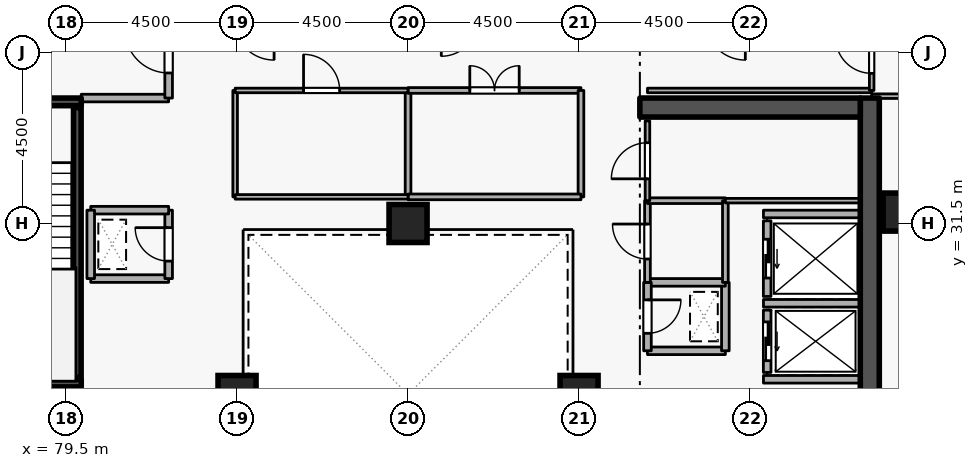
"""IFC4 building model, lengths in metres.
Left out: names, types, materials, properties, quantities, classifications, styles, units other than length and angle.
Written with IfcOpenShell. Run it as: python <this file> out.ifc"""

import sys

from ifc_helpers import new_model, si_unit, direction, frame, frame_2d, origin, origin_2d, place, context, subcontext, project, spatial, rectangle, extrude, element, fill, save


model = new_model("IFC4")
c1 = context("Model", 3, precision=1e-05, world=origin(), true_north=direction((0.0, 1.0)))
c2 = subcontext(c1, "Body", "Model", "MODEL_VIEW")
j1 = project(units=[si_unit("LENGTHUNIT", "METRE"), si_unit("PLANEANGLEUNIT", "RADIAN")], contexts=[c1])
p1 = place(None, origin())
s1 = spatial("IfcSite", under=j1, at=p1, CompositionType="ELEMENT")
p2 = place(p1, origin())
s2 = spatial("IfcBuilding", under=s1, at=p2, CompositionType="ELEMENT")
p3 = place(p2, frame((0.0, 0.0, 214.5)))
s3 = spatial("IfcBuildingStorey", under=s2, at=p3, CompositionType="ELEMENT", Elevation=214.5)
p4 = place(p3, frame((100.65, 19.2, 0.0), z_axis=(0.0, 0.0, 1.0), x_axis=(0.0, 1.0, 0.0)))
e1 = element("IfcWall", 1, at=p4, inside=s3, PredefinedType="SHEAR", context=c2, shape_type="SweptSolid", body=[
    extrude(rectangle(XDim=15.6, YDim=0.5, at=frame_2d((7.8, 0.0))), origin(), (0.0, 0.0, 1.0), 3.6),
])
p5 = place(p3, frame((94.6, 34.55, 0.0), z_axis=(0.0, 0.0, 1.0), x_axis=(1.0, 0.0, 0.0)))
e2 = element("IfcWall", 2, at=p5, inside=s3, PredefinedType="SHEAR", context=c2, shape_type="SweptSolid", body=[
    extrude(rectangle(XDim=5.8, YDim=0.5, at=frame_2d((2.9, 0.0))), origin(), (0.0, 0.0, 1.0), 3.6),
])
for number, where, z_axis, x_axis in (
    (3, (101.5, 31.8, 0.0), (0.0, 0.0, 1.0), (1.0, 0.0, 0.0)),
    (4, (93.0, 27.0, 0.0), (0.0, 0.0, 1.0), (1.0, 0.0, 0.0)),
    (5, (84.0, 27.0, 0.0), (0.0, 0.0, 1.0), (1.0, 0.0, 0.0)),
    (6, (88.5, 31.5, 0.0), (0.0, 0.0, 1.0), (1.0, 0.0, 0.0)),
):
    element("IfcColumn", number, at=place(p3, frame(where, z_axis=z_axis, x_axis=x_axis)), inside=s3, PredefinedType="COLUMN", context=c2, shape_type="SweptSolid", body=[
        extrude(rectangle(XDim=1.0, YDim=1.0, at=origin_2d()), origin(), (0.0, 0.0, 1.0), 3.6),
    ])
p6 = place(p3, frame((97.95, 29.22, 0.0), z_axis=(0.0, 0.0, 1.0), x_axis=(0.0, -1.0, 0.0)))
e7 = element("IfcWall", 7, at=p6, inside=s3, PredefinedType="STANDARD", context=c2, shape_type="SweptSolid", body=[
    extrude(rectangle(XDim=1.64, YDim=0.2, at=frame_2d((0.82, 0.0))), origin(), (0.0, 0.0, 1.0), 3.34),
])
p7 = place(p6, frame((0.31, 0.0, 0.0)))
e8 = element("IfcOpeningElement", 8, at=p7, cuts=e7, PredefinedType="OPENING", context=c2, shape_type="SweptSolid", body=[
    extrude(rectangle(XDim=1.02, YDim=2.06, at=frame_2d((0.51, 1.03))), frame((0.0, 0.11, 0.0), z_axis=(0.0, -1.0, 0.0), x_axis=(1.0, 0.0, 0.0)), (0.0, 0.0, 1.0), 0.22),
])
p8 = place(p3, frame((97.95, 31.57, 0.0), z_axis=(0.0, 0.0, 1.0), x_axis=(0.0, -1.0, 0.0)))
e9 = element("IfcWall", 9, at=p8, inside=s3, PredefinedType="STANDARD", context=c2, shape_type="SweptSolid", body=[
    extrude(rectangle(XDim=1.99, YDim=0.2, at=frame_2d((0.995, 0.0))), origin(), (0.0, 0.0, 1.0), 3.34),
])
p9 = place(p8, frame((0.485, 0.0, 0.0)))
e10 = element("IfcOpeningElement", 10, at=p9, cuts=e9, PredefinedType="OPENING", context=c2, shape_type="SweptSolid", body=[
    extrude(rectangle(XDim=1.02, YDim=2.06, at=frame_2d((0.51, 1.03))), frame((0.0, 0.11, 0.0), z_axis=(0.0, -1.0, 0.0), x_axis=(1.0, 0.0, 0.0)), (0.0, 0.0, 1.0), 0.22),
])
for number, where, z_axis, x_axis in (
    (11, (97.852, 29.4, 0.0), (0.0, 0.0, 1.0), (1.0, 0.0, 0.0)),
    (12, (97.852, 27.4, 0.0), (0.0, 0.0, 1.0), (1.0, 0.0, 0.0)),
    (13, (97.852, 31.75, 0.0), (0.0, 0.0, 1.0), (1.0, 0.0, 0.0)),
):
    element("IfcWall", number, at=place(p3, frame(where, z_axis=z_axis, x_axis=x_axis)), inside=s3, PredefinedType="STANDARD", context=c2, shape_type="SweptSolid", body=[
        extrude(rectangle(XDim=2.536, YDim=0.2, at=frame_2d((1.268, 0.0))), origin(), (0.0, 0.0, 1.0), 3.34),
    ])
p10 = place(p3, frame((76.55, 34.7, 0.0), z_axis=(0.0, 0.0, 1.0), x_axis=(1.0, 0.0, 0.0)))
e14 = element("IfcWall", 14, at=p10, inside=s3, PredefinedType="SHEAR", context=c2, shape_type="SweptSolid", body=[
    extrude(rectangle(XDim=3.35, YDim=0.2, at=frame_2d((1.675, 0.0))), origin(), (0.0, 0.0, 1.0), 3.6),
])
p11 = place(p10, frame((1.125, 0.0, 0.0)))
e15 = element("IfcOpeningElement", 15, at=p11, cuts=e14, PredefinedType="OPENING", context=c2, shape_type="SweptSolid", body=[
    extrude(rectangle(XDim=1.1, YDim=2.1, at=frame_2d((0.55, 1.05))), frame((0.0, 0.11, 0.0), z_axis=(0.0, -1.0, 0.0), x_axis=(1.0, 0.0, 0.0)), (0.0, 0.0, 1.0), 0.22),
])
p12 = place(p3, frame((79.9, 27.3, 0.0), z_axis=(0.0, 0.0, 1.0), x_axis=(-1.0, 0.0, 0.0)))
e16 = element("IfcWall", 16, at=p12, inside=s3, PredefinedType="SHEAR", context=c2, shape_type="SweptSolid", body=[
    extrude(rectangle(XDim=3.35, YDim=0.2, at=frame_2d((1.675, 0.0))), origin(), (0.0, 0.0, 1.0), 3.6),
])
p13 = place(p3, frame((79.797, 27.45, 0.0), z_axis=(0.0, 0.0, 1.0), x_axis=(0.0, 1.0, 0.0)))
e17 = element("IfcWall", 17, at=p13, inside=s3, PredefinedType="SHEAR", context=c2, shape_type="SweptSolid", body=[
    extrude(rectangle(XDim=7.1, YDim=0.2, at=frame_2d((3.55, 0.0))), origin(), (0.0, 0.0, 1.0), 3.6),
])
p14 = place(p3, frame((79.9, 34.8, 0.0), z_axis=(0.0, 0.0, 1.0), x_axis=(1.0, 0.0, 0.0)))
e18 = element("IfcWall", 18, at=p14, inside=s3, PredefinedType="STANDARD", context=c2, shape_type="SweptSolid", body=[
    extrude(rectangle(XDim=2.3, YDim=0.2, at=frame_2d((1.15, 0.0))), origin(), (0.0, 0.0, 1.0), 2.545),
])
p15 = place(p3, frame((82.2, 34.8, 0.0), z_axis=(0.0, 0.0, 1.0), x_axis=(0.0, 1.0, 0.0)))
e19 = element("IfcWall", 19, at=p15, inside=s3, PredefinedType="STANDARD", context=c2, shape_type="SweptSolid", body=[
    extrude(rectangle(XDim=2.5, YDim=0.2, at=frame_2d((1.25, 0.0))), origin(), (0.0, 0.0, 1.0), 3.34),
])
p16 = place(p15, frame((0.66, 0.0, 0.0)))
e20 = element("IfcOpeningElement", 20, at=p16, cuts=e19, PredefinedType="OPENING", context=c2, shape_type="SweptSolid", body=[
    extrude(rectangle(XDim=1.15, YDim=2.1, at=frame_2d((0.575, 1.05))), frame((0.0, 0.11, 0.0), z_axis=(0.0, -1.0, 0.0), x_axis=(1.0, 0.0, 0.0)), (0.0, 0.0, 1.0), 0.22),
])
p17 = place(p3, frame((94.8, 28.15, 0.0), z_axis=(0.0, 0.0, 1.0), x_axis=(1.0, 0.0, 0.0)))
e21 = element("IfcWall", 21, at=p17, inside=s3, PredefinedType="STANDARD", context=c2, shape_type="SweptSolid", body=[
    extrude(rectangle(XDim=2.05, YDim=0.2, at=frame_2d((1.025, 0.0))), origin(), (0.0, 0.0, 1.0), 3.34),
])
p18 = place(p3, frame((96.85, 28.15, 0.0), z_axis=(0.0, 0.0, 1.0), x_axis=(0.0, 1.0, 0.0)))
e22 = element("IfcWall", 22, at=p18, inside=s3, PredefinedType="STANDARD", context=c2, shape_type="SweptSolid", body=[
    extrude(rectangle(XDim=1.8, YDim=0.2, at=frame_2d((0.9, 0.0))), origin(), (0.0, 0.0, 1.0), 3.34),
])
p19 = place(p3, frame((96.85, 29.95, 0.0), z_axis=(0.0, 0.0, 1.0), x_axis=(-1.0, 0.0, 0.0)))
e23 = element("IfcWall", 23, at=p19, inside=s3, PredefinedType="STANDARD", context=c2, shape_type="SweptSolid", body=[
    extrude(rectangle(XDim=2.05, YDim=0.2, at=frame_2d((1.025, 0.0))), origin(), (0.0, 0.0, 1.0), 3.34),
])
p20 = place(p3, frame((94.8, 29.95, 0.0), z_axis=(0.0, 0.0, 1.0), x_axis=(0.0, -1.0, 0.0)))
e24 = element("IfcWall", 24, at=p20, inside=s3, PredefinedType="STANDARD", context=c2, shape_type="SweptSolid", body=[
    extrude(rectangle(XDim=1.8, YDim=0.2, at=frame_2d((0.9, 0.0))), origin(), (0.0, 0.0, 1.0), 3.34),
])
p21 = place(p20, frame((0.46, 0.0, 0.0)))
e25 = element("IfcOpeningElement", 25, at=p21, cuts=e24, PredefinedType="OPENING", context=c2, shape_type="SweptSolid", body=[
    extrude(rectangle(XDim=0.88, YDim=2.04, at=frame_2d((0.44, 1.02))), frame((0.0, 0.11, 0.0), z_axis=(0.0, -1.0, 0.0), x_axis=(1.0, 0.0, 0.0)), (0.0, 0.0, 1.0), 0.22),
])
p22 = place(p3, frame((80.15, 30.05, 0.0), z_axis=(0.0, 0.0, 1.0), x_axis=(1.0, 0.0, 0.0)))
e26 = element("IfcWall", 26, at=p22, inside=s3, PredefinedType="STANDARD", context=c2, shape_type="SweptSolid", body=[
    extrude(rectangle(XDim=2.05, YDim=0.2, at=frame_2d((1.025, 0.0))), origin(), (0.0, 0.0, 1.0), 3.34),
])
p23 = place(p3, frame((82.2, 30.05, 0.0), z_axis=(0.0, 0.0, 1.0), x_axis=(0.0, 1.0, 0.0)))
e27 = element("IfcWall", 27, at=p23, inside=s3, PredefinedType="STANDARD", context=c2, shape_type="SweptSolid", body=[
    extrude(rectangle(XDim=1.8, YDim=0.2, at=frame_2d((0.9, 0.0))), origin(), (0.0, 0.0, 1.0), 3.34),
])
p24 = place(p23, frame((0.46, 0.0, 0.0)))
e28 = element("IfcOpeningElement", 28, at=p24, cuts=e27, PredefinedType="OPENING", context=c2, shape_type="SweptSolid", body=[
    extrude(rectangle(XDim=0.88, YDim=2.04, at=frame_2d((0.44, 1.02))), frame((0.0, 0.11, 0.0), z_axis=(0.0, -1.0, 0.0), x_axis=(1.0, 0.0, 0.0)), (0.0, 0.0, 1.0), 0.22),
])
p25 = place(p3, frame((82.2, 31.85, 0.0), z_axis=(0.0, 0.0, 1.0), x_axis=(-1.0, 0.0, 0.0)))
e29 = element("IfcWall", 29, at=p25, inside=s3, PredefinedType="STANDARD", context=c2, shape_type="SweptSolid", body=[
    extrude(rectangle(XDim=2.05, YDim=0.2, at=frame_2d((1.025, 0.0))), origin(), (0.0, 0.0, 1.0), 3.34),
])
p26 = place(p3, frame((80.15, 31.85, 0.0), z_axis=(0.0, 0.0, 1.0), x_axis=(0.0, -1.0, 0.0)))
e30 = element("IfcWall", 30, at=p26, inside=s3, PredefinedType="STANDARD", context=c2, shape_type="SweptSolid", body=[
    extrude(rectangle(XDim=1.8, YDim=0.2, at=frame_2d((0.9, 0.0))), origin(), (0.0, 0.0, 1.0), 3.34),
])
p27 = place(p3, frame((94.8, 29.95, 0.0), z_axis=(0.0, 0.0, 1.0), x_axis=(0.0, 1.0, 0.0)))
e31 = element("IfcWall", 31, at=p27, inside=s3, PredefinedType="PARTITIONING", context=c2, shape_type="SweptSolid", body=[
    extrude(rectangle(XDim=2.15, YDim=0.15, at=frame_2d((1.075, 0.0))), origin(), (0.0, 0.0, 1.0), 3.34),
])
p28 = place(p27, frame((0.615, 0.0, 0.0)))
e32 = element("IfcOpeningElement", 32, at=p28, cuts=e31, PredefinedType="OPENING", context=c2, shape_type="SweptSolid", body=[
    extrude(rectangle(XDim=0.92, YDim=2.08, at=frame_2d((0.46, 1.04))), frame((0.0, 0.085, 0.0), z_axis=(0.0, -1.0, 0.0), x_axis=(1.0, 0.0, 0.0)), (0.0, 0.0, 1.0), 0.17),
])
p29 = place(p3, frame((94.8, 32.1, 0.0), z_axis=(0.0, 0.0, 1.0), x_axis=(1.0, 0.0, 0.0)))
e33 = element("IfcWall", 33, at=p29, inside=s3, PredefinedType="PARTITIONING", context=c2, shape_type="SweptSolid", body=[
    extrude(rectangle(XDim=2.05, YDim=0.15, at=frame_2d((1.025, 0.0))), origin(), (0.0, 0.0, 1.0), 3.34),
])
p30 = place(p3, frame((96.85, 32.1, 0.0), z_axis=(0.0, 0.0, 1.0), x_axis=(0.0, -1.0, 0.0)))
e34 = element("IfcWall", 34, at=p30, inside=s3, PredefinedType="PARTITIONING", context=c2, shape_type="SweptSolid", body=[
    extrude(rectangle(XDim=2.15, YDim=0.15, at=frame_2d((1.075, 0.0))), origin(), (0.0, 0.0, 1.0), 3.34),
])
p31 = place(p3, frame((94.8, 32.1, 0.0), z_axis=(0.0, 0.0, 1.0), x_axis=(0.0, 1.0, 0.0)))
e35 = element("IfcWall", 35, at=p31, inside=s3, PredefinedType="PARTITIONING", context=c2, shape_type="SweptSolid", body=[
    extrude(rectangle(XDim=2.1, YDim=0.12, at=frame_2d((1.05, 0.0))), origin(), (0.0, 0.0, 1.0), 3.34),
])
p32 = place(p31, frame((0.575, 0.0, 0.0)))
e36 = element("IfcOpeningElement", 36, at=p32, cuts=e35, PredefinedType="OPENING", context=c2, shape_type="SweptSolid", body=[
    extrude(rectangle(XDim=0.95, YDim=2.1, at=frame_2d((0.475, 1.05))), frame((0.0, 0.07, 0.0), z_axis=(0.0, -1.0, 0.0), x_axis=(1.0, 0.0, 0.0)), (0.0, 0.0, 1.0), 0.14),
])
p33 = place(p3, frame((100.4, 32.1, 0.0), z_axis=(0.0, 0.0, 1.0), x_axis=(-1.0, 0.0, 0.0)))
e37 = element("IfcWall", 37, at=p33, inside=s3, PredefinedType="PARTITIONING", context=c2, shape_type="SweptSolid", body=[
    extrude(rectangle(XDim=3.55, YDim=0.12, at=frame_2d((1.775, 0.0))), origin(), (0.0, 0.0, 1.0), 3.34),
])
p34 = place(p3, frame((94.8, 35.0, 0.0), z_axis=(0.0, 0.0, 1.0), x_axis=(1.0, 0.0, 0.0)))
e38 = element("IfcWall", 38, at=p34, inside=s3, PredefinedType="PARTITIONING", context=c2, shape_type="SweptSolid", body=[
    extrude(rectangle(XDim=5.9, YDim=0.12, at=frame_2d((2.95, 0.0))), origin(), (0.0, 0.0, 1.0), 3.34),
])
p35 = place(p3, frame((100.7, 35.0, 0.0), z_axis=(0.0, 0.0, 1.0), x_axis=(0.0, 1.0, 0.0)))
e39 = element("IfcWall", 39, at=p35, inside=s3, PredefinedType="PARTITIONING", context=c2, shape_type="SweptSolid", body=[
    extrude(rectangle(XDim=1.85, YDim=0.12, at=frame_2d((0.925, 0.0))), origin(), (0.0, 0.0, 1.0), 3.34),
])
p36 = place(p35, frame((0.45, 0.0, 0.0)))
e40 = element("IfcOpeningElement", 40, at=p36, cuts=e39, PredefinedType="OPENING", context=c2, shape_type="SweptSolid", body=[
    extrude(rectangle(XDim=0.95, YDim=2.1, at=frame_2d((0.475, 1.05))), frame((0.0, 0.07, 0.0), z_axis=(0.0, -1.0, 0.0), x_axis=(1.0, 0.0, 0.0)), (0.0, 0.0, 1.0), 0.14),
])
p37 = place(p3, frame((106.22, 34.85, 0.0), z_axis=(0.0, 0.0, 1.0), x_axis=(-1.0, 0.0, 0.0)))
e41 = element("IfcWall", 41, at=p37, inside=s3, PredefinedType="PARTITIONING", context=c2, shape_type="SweptSolid", body=[
    extrude(rectangle(XDim=5.52, YDim=0.12, at=frame_2d((2.76, 0.0))), origin(), (0.0, 0.0, 1.0), 3.34),
])
p38 = place(p3, frame((88.5, 32.2, 0.0), z_axis=(0.0, 0.0, 1.0), x_axis=(0.0, 1.0, 0.0)))
e42 = element("IfcWall", 42, at=p38, inside=s3, PredefinedType="PARTITIONING", context=c2, shape_type="SweptSolid", body=[
    extrude(rectangle(XDim=2.8, YDim=0.15, at=frame_2d((1.4, 0.0))), origin(), (0.0, 0.0, 1.0), 2.878),
])
p39 = place(p3, frame((88.5, 35.0, 0.0), z_axis=(0.0, 0.0, 1.0), x_axis=(1.0, 0.0, 0.0)))
e43 = element("IfcWall", 43, at=p39, inside=s3, PredefinedType="PARTITIONING", context=c2, shape_type="SweptSolid", body=[
    extrude(rectangle(XDim=4.55, YDim=0.15, at=frame_2d((2.275, 0.0))), origin(), (0.0, 0.0, 1.0), 3.34),
])
p40 = place(p39, frame((1.625, 0.0, 0.0)))
e44 = element("IfcOpeningElement", 44, at=p40, cuts=e43, PredefinedType="OPENING", context=c2, shape_type="SweptSolid", body=[
    extrude(rectangle(XDim=1.3, YDim=2.12, at=frame_2d((0.65, 1.06))), frame((0.0, 0.085, 0.0), z_axis=(0.0, -1.0, 0.0), x_axis=(1.0, 0.0, 0.0)), (0.0, 0.0, 1.0), 0.17),
])
p41 = place(p3, frame((93.05, 35.0, 0.0), z_axis=(0.0, 0.0, 1.0), x_axis=(0.0, -1.0, 0.0)))
e45 = element("IfcWall", 45, at=p41, inside=s3, PredefinedType="PARTITIONING", context=c2, shape_type="SweptSolid", body=[
    extrude(rectangle(XDim=2.8, YDim=0.15, at=frame_2d((1.4, 0.0))), origin(), (0.0, 0.0, 1.0), 3.34),
])
p42 = place(p3, frame((93.05, 32.2, 0.0), z_axis=(0.0, 0.0, 1.0), x_axis=(-1.0, 0.0, 0.0)))
e46 = element("IfcWall", 46, at=p42, inside=s3, PredefinedType="PARTITIONING", context=c2, shape_type="SweptSolid", body=[
    extrude(rectangle(XDim=4.55, YDim=0.15, at=frame_2d((2.275, 0.0))), origin(), (0.0, 0.0, 1.0), 3.34),
])
p43 = place(p3, frame((83.95, 32.2, 0.0), z_axis=(0.0, 0.0, 1.0), x_axis=(0.0, 1.0, 0.0)))
e47 = element("IfcWall", 47, at=p43, inside=s3, PredefinedType="PARTITIONING", context=c2, shape_type="SweptSolid", body=[
    extrude(rectangle(XDim=2.8, YDim=0.12, at=frame_2d((1.4, 0.0))), origin(), (0.0, 0.0, 1.0), 3.34),
])
p44 = place(p3, frame((83.95, 35.0, 0.0), z_axis=(0.0, 0.0, 1.0), x_axis=(1.0, 0.0, 0.0)))
e48 = element("IfcWall", 48, at=p44, inside=s3, PredefinedType="PARTITIONING", context=c2, shape_type="SweptSolid", body=[
    extrude(rectangle(XDim=4.55, YDim=0.12, at=frame_2d((2.275, 0.0))), origin(), (0.0, 0.0, 1.0), 3.34),
])
p45 = place(p44, frame((1.8, 0.0, 0.0)))
e49 = element("IfcOpeningElement", 49, at=p45, cuts=e48, PredefinedType="OPENING", context=c2, shape_type="SweptSolid", body=[
    extrude(rectangle(XDim=0.95, YDim=2.1, at=frame_2d((0.475, 1.05))), frame((0.0, 0.07, 0.0), z_axis=(0.0, -1.0, 0.0), x_axis=(1.0, 0.0, 0.0)), (0.0, 0.0, 1.0), 0.14),
])
p46 = place(p3, frame((88.5, 32.2, 0.0), z_axis=(0.0, 0.0, 1.0), x_axis=(-1.0, 0.0, 0.0)))
e50 = element("IfcWall", 50, at=p46, inside=s3, PredefinedType="PARTITIONING", context=c2, shape_type="SweptSolid", body=[
    extrude(rectangle(XDim=4.55, YDim=0.12, at=frame_2d((2.275, 0.0))), origin(), (0.0, 0.0, 1.0), 3.34),
])
p47 = place(p7, origin())
e51 = element("IfcDoor", 51, at=p47, inside=s3, OperationType="SLIDING_TO_LEFT", PredefinedType="DOOR", context=c2, shape_type="SweptSolid", body=[
    extrude(rectangle(XDim=1.02, YDim=2.06, at=frame_2d((0.51, 1.03))), frame((0.0, 0.025, 0.0), z_axis=(0.0, -1.0, 0.0), x_axis=(1.0, 0.0, 0.0)), (0.0, 0.0, 1.0), 0.05),
])
fill(e8, e51)
p48 = place(p9, origin())
e52 = element("IfcDoor", 52, at=p48, inside=s3, OperationType="SLIDING_TO_LEFT", PredefinedType="DOOR", context=c2, shape_type="SweptSolid", body=[
    extrude(rectangle(XDim=1.02, YDim=2.06, at=frame_2d((0.51, 1.03))), frame((0.0, 0.025, 0.0), z_axis=(0.0, -1.0, 0.0), x_axis=(1.0, 0.0, 0.0)), (0.0, 0.0, 1.0), 0.05),
])
fill(e10, e52)
p49 = place(p16, origin())
e53 = element("IfcDoor", 53, at=p49, inside=s3, OperationType="SINGLE_SWING_RIGHT", PredefinedType="DOOR", context=c2, shape_type="SweptSolid", body=[
    extrude(rectangle(XDim=1.15, YDim=2.1, at=frame_2d((0.575, 1.05))), frame((0.0, 0.025, 0.0), z_axis=(0.0, -1.0, 0.0), x_axis=(1.0, 0.0, 0.0)), (0.0, 0.0, 1.0), 0.05),
])
fill(e20, e53)
p50 = place(p21, origin())
e54 = element("IfcDoor", 54, at=p50, inside=s3, OperationType="SINGLE_SWING_LEFT", PredefinedType="DOOR", context=c2, shape_type="SweptSolid", body=[
    extrude(rectangle(XDim=0.88, YDim=2.04, at=frame_2d((0.44, 1.02))), frame((0.0, 0.025, 0.0), z_axis=(0.0, -1.0, 0.0), x_axis=(1.0, 0.0, 0.0)), (0.0, 0.0, 1.0), 0.05),
])
fill(e25, e54)
p51 = place(p24, origin())
e55 = element("IfcDoor", 55, at=p51, inside=s3, OperationType="SINGLE_SWING_RIGHT", PredefinedType="DOOR", context=c2, shape_type="SweptSolid", body=[
    extrude(rectangle(XDim=0.88, YDim=2.04, at=frame_2d((0.44, 1.02))), frame((0.0, 0.025, 0.0), z_axis=(0.0, -1.0, 0.0), x_axis=(1.0, 0.0, 0.0)), (0.0, 0.0, 1.0), 0.05),
])
fill(e28, e55)
p52 = place(p28, origin())
e56 = element("IfcDoor", 56, at=p52, inside=s3, OperationType="SINGLE_SWING_RIGHT", PredefinedType="DOOR", context=c2, shape_type="SweptSolid", body=[
    extrude(rectangle(XDim=0.92, YDim=2.08, at=frame_2d((0.46, 1.04))), frame((0.0, 0.025, 0.0), z_axis=(0.0, -1.0, 0.0), x_axis=(1.0, 0.0, 0.0)), (0.0, 0.0, 1.0), 0.05),
])
fill(e32, e56)
p53 = place(p32, origin())
e57 = element("IfcDoor", 57, at=p53, inside=s3, OperationType="SINGLE_SWING_LEFT", PredefinedType="DOOR", context=c2, shape_type="SweptSolid", body=[
    extrude(rectangle(XDim=0.95, YDim=2.1, at=frame_2d((0.475, 1.05))), frame((0.0, 0.025, 0.0), z_axis=(0.0, -1.0, 0.0), x_axis=(1.0, 0.0, 0.0)), (0.0, 0.0, 1.0), 0.05),
])
fill(e36, e57)
p54 = place(p36, origin())
e58 = element("IfcDoor", 58, at=p54, inside=s3, OperationType="SINGLE_SWING_RIGHT", PredefinedType="DOOR", context=c2, shape_type="SweptSolid", body=[
    extrude(rectangle(XDim=0.95, YDim=2.1, at=frame_2d((0.475, 1.05))), frame((0.0, 0.025, 0.0), z_axis=(0.0, -1.0, 0.0), x_axis=(1.0, 0.0, 0.0)), (0.0, 0.0, 1.0), 0.05),
])
fill(e40, e58)
p55 = place(p40, origin())
e59 = element("IfcDoor", 59, at=p55, inside=s3, OperationType="DOUBLE_DOOR_SINGLE_SWING", PredefinedType="DOOR", context=c2, shape_type="SweptSolid", body=[
    extrude(rectangle(XDim=1.3, YDim=2.12, at=frame_2d((0.65, 1.06))), frame((0.0, 0.025, 0.0), z_axis=(0.0, -1.0, 0.0), x_axis=(1.0, 0.0, 0.0)), (0.0, 0.0, 1.0), 0.05),
])
fill(e44, e59)
p56 = place(p45, origin())
e60 = element("IfcDoor", 60, at=p56, inside=s3, OperationType="SINGLE_SWING_LEFT", PredefinedType="DOOR", context=c2, shape_type="SweptSolid", body=[
    extrude(rectangle(XDim=0.95, YDim=2.1, at=frame_2d((0.475, 1.05))), frame((0.0, 0.025, 0.0), z_axis=(0.0, -1.0, 0.0), x_axis=(1.0, 0.0, 0.0)), (0.0, 0.0, 1.0), 0.05),
])
fill(e49, e60)
save(model, sys.argv[1])
